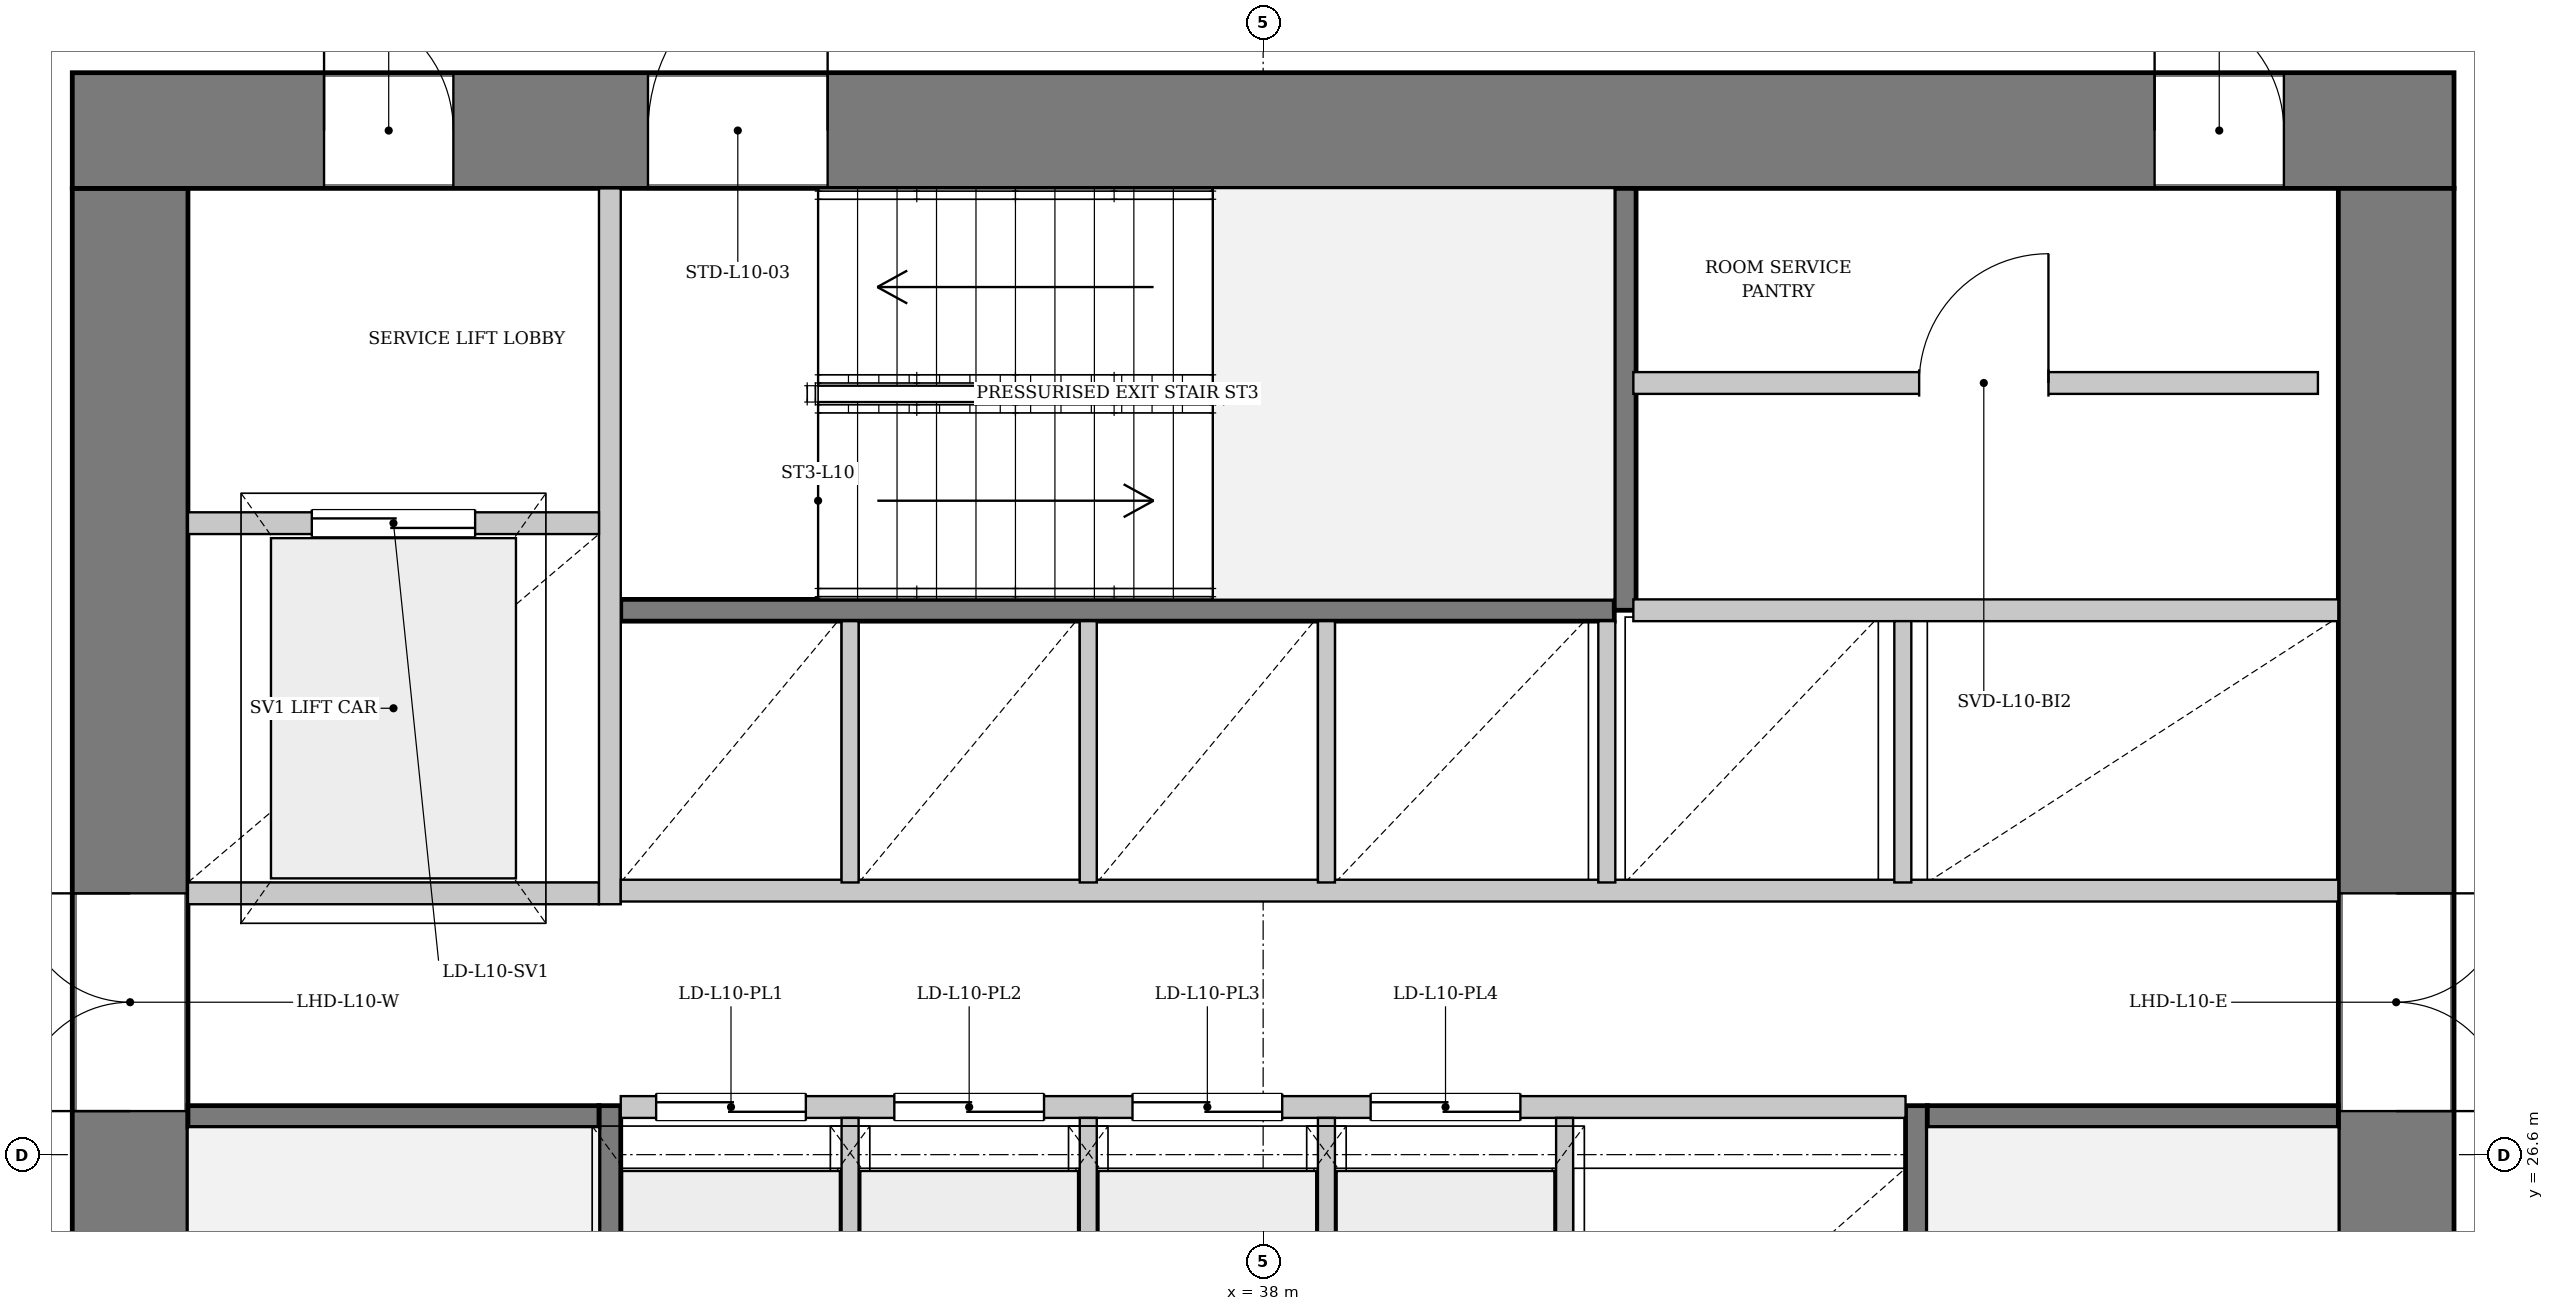
"""IFC4 building model, lengths in metres.
Left out: names, types, materials, properties, quantities, classifications, styles, units other than length and angle.
Written with IfcOpenShell. Run it as: python <this file> out.ifc"""

import sys

from ifc_helpers import new_model, si_unit, direction, frame, frame_2d, origin, place, context, subcontext, project, spatial, rectangle, extrude, source, transform, mapped, element, fill, save


model = new_model("IFC4")
c1 = context("Model", 3, precision=1e-05, world=origin(), true_north=direction((0.0, 1.0)))
c2 = subcontext(c1, "Body", "Model", "MODEL_VIEW")
j1 = project(units=[si_unit("LENGTHUNIT", "METRE"), si_unit("PLANEANGLEUNIT", "RADIAN")], contexts=[c1])
p1 = place(None, origin())
s1 = spatial("IfcSite", under=j1, at=p1, CompositionType="ELEMENT")
p2 = place(p1, origin())
s2 = spatial("IfcBuilding", under=s1, at=p2, CompositionType="ELEMENT")
p3 = place(p2, frame((0.0, 0.0, 43.5)))
s3 = spatial("IfcBuildingStorey", under=s2, at=p3, CompositionType="ELEMENT", Elevation=43.5)
p4 = place(p3, frame((29.675, 19.5, 0.0), z_axis=(0.0, 0.0, 1.0), x_axis=(0.0, 1.0, 0.0)))
e1 = element("IfcWall", 1, at=p4, inside=s3, PredefinedType="SHEAR", context=c2, shape_type="SweptSolid", body=[
    extrude(rectangle(XDim=14.2, YDim=0.85, at=frame_2d((7.1, 0.0))), origin(), (0.0, 0.0, 1.0), 3.3),
])
p5 = place(p4, frame((7.42, 0.0, 0.0)))
e2 = element("IfcOpeningElement", 2, at=p5, cuts=e1, PredefinedType="OPENING", context=c2, shape_type="SweptSolid", body=[
    extrude(rectangle(XDim=1.6, YDim=2.2, at=frame_2d((0.8, 1.1))), frame((0.0, 0.435, 0.0), z_axis=(0.0, -1.0, 0.0), x_axis=(1.0, 0.0, 0.0)), (0.0, 0.0, 1.0), 0.87),
])
p6 = place(p3, frame((29.25, 34.125, 0.0), z_axis=(0.0, 0.0, 1.0), x_axis=(1.0, 0.0, 0.0)))
e3 = element("IfcWall", 3, at=p6, inside=s3, PredefinedType="SHEAR", context=c2, shape_type="SweptSolid", body=[
    extrude(rectangle(XDim=17.5, YDim=0.85, at=frame_2d((8.75, 0.0))), origin(), (0.0, 0.0, 1.0), 3.3),
])
p7 = place(p6, frame((1.85, 0.0, 0.0)))
e4 = element("IfcOpeningElement", 4, at=p7, cuts=e3, PredefinedType="OPENING", context=c2, shape_type="SweptSolid", body=[
    extrude(rectangle(XDim=0.95, YDim=2.1, at=frame_2d((0.475, 1.05))), frame((0.0, 0.435, 0.0), z_axis=(0.0, -1.0, 0.0), x_axis=(1.0, 0.0, 0.0)), (0.0, 0.0, 1.0), 0.87),
])
p8 = place(p6, frame((4.23, 0.0, 0.0)))
e5 = element("IfcOpeningElement", 5, at=p8, cuts=e3, PredefinedType="OPENING", context=c2, shape_type="SweptSolid", body=[
    extrude(rectangle(XDim=1.32, YDim=2.2, at=frame_2d((0.66, 1.1))), frame((0.0, 0.435, 0.0), z_axis=(0.0, -1.0, 0.0), x_axis=(1.0, 0.0, 0.0)), (0.0, 0.0, 1.0), 0.87),
])
p9 = place(p6, frame((15.3, 0.0, 0.0)))
e6 = element("IfcOpeningElement", 6, at=p9, cuts=e3, PredefinedType="OPENING", context=c2, shape_type="SweptSolid", body=[
    extrude(rectangle(XDim=0.95, YDim=2.1, at=frame_2d((0.475, 1.05))), frame((0.0, 0.435, 0.0), z_axis=(0.0, -1.0, 0.0), x_axis=(1.0, 0.0, 0.0)), (0.0, 0.0, 1.0), 0.87),
])
p10 = place(p3, frame((46.325, 33.7, 0.0), z_axis=(0.0, 0.0, 1.0), x_axis=(0.0, -1.0, 0.0)))
e7 = element("IfcWall", 7, at=p10, inside=s3, PredefinedType="SHEAR", context=c2, shape_type="SweptSolid", body=[
    extrude(rectangle(XDim=14.2, YDim=0.85, at=frame_2d((7.1, 0.0))), origin(), (0.0, 0.0, 1.0), 3.3),
])
p11 = place(p10, frame((5.18, 0.0, 0.0)))
e8 = element("IfcOpeningElement", 8, at=p11, cuts=e7, PredefinedType="OPENING", context=c2, shape_type="SweptSolid", body=[
    extrude(rectangle(XDim=1.6, YDim=2.2, at=frame_2d((0.8, 1.1))), frame((0.0, 0.435, 0.0), z_axis=(0.0, -1.0, 0.0), x_axis=(1.0, 0.0, 0.0)), (0.0, 0.0, 1.0), 0.87),
])
p12 = place(p3, frame((33.2, 19.5, 0.0), z_axis=(0.0, 0.0, 1.0), x_axis=(0.0, 1.0, 0.0)))
e9 = element("IfcWall", 9, at=p12, inside=s3, PredefinedType="PARTITIONING", context=c2, shape_type="SweptSolid", body=[
    extrude(rectangle(XDim=7.46, YDim=0.16, at=frame_2d((3.73, 0.0))), origin(), (0.0, 0.0, 1.0), 3.3),
])
p13 = place(p12, frame((0.08, 0.0, 0.0)))
e10 = element("IfcOpeningElement", 10, at=p13, cuts=e9, PredefinedType="OPENING", context=c2, shape_type="SweptSolid", body=[
    extrude(rectangle(XDim=1.32, YDim=2.2, at=frame_2d((0.66, 1.1))), frame((0.0, 0.09, 0.0), z_axis=(0.0, -1.0, 0.0), x_axis=(1.0, 0.0, 0.0)), (0.0, 0.0, 1.0), 0.18),
])
p14 = place(p3, frame((30.1, 26.88, 0.0), z_axis=(0.0, 0.0, 1.0), x_axis=(1.0, 0.0, 0.0)))
e11 = element("IfcWall", 11, at=p14, inside=s3, PredefinedType="PARTITIONING", context=c2, shape_type="SweptSolid", body=[
    extrude(rectangle(XDim=3.02, YDim=0.16, at=frame_2d((1.51, 0.0))), origin(), (0.0, 0.0, 1.0), 3.3),
])
p15 = place(p3, frame((42.8, 26.96, 0.0), z_axis=(0.0, 0.0, 1.0), x_axis=(0.0, -1.0, 0.0)))
e12 = element("IfcWall", 12, at=p15, inside=s3, PredefinedType="PARTITIONING", context=c2, shape_type="SweptSolid", body=[
    extrude(rectangle(XDim=7.46, YDim=0.16, at=frame_2d((3.73, 0.0))), origin(), (0.0, 0.0, 1.0), 3.3),
])
p16 = place(p15, frame((6.06, 0.0, 0.0)))
e13 = element("IfcOpeningElement", 13, at=p16, cuts=e12, PredefinedType="OPENING", context=c2, shape_type="SweptSolid", body=[
    extrude(rectangle(XDim=1.32, YDim=2.2, at=frame_2d((0.66, 1.1))), frame((0.0, 0.09, 0.0), z_axis=(0.0, -1.0, 0.0), x_axis=(1.0, 0.0, 0.0)), (0.0, 0.0, 1.0), 0.18),
])
p17 = place(p3, frame((42.88, 26.88, 0.0), z_axis=(0.0, 0.0, 1.0), x_axis=(1.0, 0.0, 0.0)))
e14 = element("IfcWall", 14, at=p17, inside=s3, PredefinedType="PARTITIONING", context=c2, shape_type="SweptSolid", body=[
    extrude(rectangle(XDim=3.02, YDim=0.16, at=frame_2d((1.51, 0.0))), origin(), (0.0, 0.0, 1.0), 3.3),
])
p18 = place(p3, frame((33.28, 30.6, 0.0), z_axis=(0.0, 0.0, 1.0), x_axis=(1.0, 0.0, 0.0)))
e15 = element("IfcWall", 15, at=p18, inside=s3, PredefinedType="PARTITIONING", context=c2, shape_type="SweptSolid", body=[
    extrude(rectangle(XDim=7.3, YDim=0.16, at=frame_2d((3.65, 0.0))), origin(), (0.0, 0.0, 1.0), 3.3),
])
p19 = place(p3, frame((40.66, 30.6, 0.0), z_axis=(0.0, 0.0, 1.0), x_axis=(0.0, 1.0, 0.0)))
e16 = element("IfcWall", 16, at=p19, inside=s3, PredefinedType="PARTITIONING", context=c2, shape_type="SweptSolid", body=[
    extrude(rectangle(XDim=3.1, YDim=0.16, at=frame_2d((1.55, 0.0))), origin(), (0.0, 0.0, 1.0), 3.3),
])
p20 = place(p3, frame((30.1, 28.52, 0.0), z_axis=(0.0, 0.0, 1.0), x_axis=(1.0, 0.0, 0.0)))
e17 = element("IfcWall", 17, at=p20, inside=s3, PredefinedType="PARTITIONING", context=c2, shape_type="SweptSolid", body=[
    extrude(rectangle(XDim=3.02, YDim=0.16, at=frame_2d((1.51, 0.0))), origin(), (0.0, 0.0, 1.0), 3.3),
])
p21 = place(p3, frame((33.2, 28.44, 0.0), z_axis=(0.0, 0.0, 1.0), x_axis=(0.0, 1.0, 0.0)))
e18 = element("IfcWall", 18, at=p21, inside=s3, PredefinedType="PARTITIONING", context=c2, shape_type="SweptSolid", body=[
    extrude(rectangle(XDim=5.26, YDim=0.16, at=frame_2d((2.63, 0.0))), origin(), (0.0, 0.0, 1.0), 3.3),
])
p22 = place(p3, frame((30.1, 31.24, 0.0), z_axis=(0.0, 0.0, 1.0), x_axis=(1.0, 0.0, 0.0)))
e19 = element("IfcWall", 19, at=p22, inside=s3, PredefinedType="PARTITIONING", context=c2, shape_type="SweptSolid", body=[
    extrude(rectangle(XDim=3.02, YDim=0.16, at=frame_2d((1.51, 0.0))), origin(), (0.0, 0.0, 1.0), 3.3),
])
p23 = place(p22, frame((0.91, 0.0, 0.0)))
e20 = element("IfcOpeningElement", 20, at=p23, cuts=e19, PredefinedType="OPENING", context=c2, shape_type="SweptSolid", body=[
    extrude(rectangle(XDim=1.2, YDim=2.2, at=frame_2d((0.6, 1.1))), frame((0.0, 0.09, 0.0), z_axis=(0.0, -1.0, 0.0), x_axis=(1.0, 0.0, 0.0)), (0.0, 0.0, 1.0), 0.18),
])
p24 = place(p3, frame((33.28, 26.95, 0.0), z_axis=(0.0, 0.0, 1.0), x_axis=(1.0, 0.0, 0.0)))
e21 = element("IfcWall", 21, at=p24, inside=s3, PredefinedType="PARTITIONING", context=c2, shape_type="SweptSolid", body=[
    extrude(rectangle(XDim=9.44, YDim=0.16, at=frame_2d((4.72, 0.0))), origin(), (0.0, 0.0, 1.0), 3.3),
])
p25 = place(p24, frame((0.26, 0.0, 0.0)))
e22 = element("IfcOpeningElement", 22, at=p25, cuts=e21, PredefinedType="OPENING", context=c2, shape_type="SweptSolid", body=[
    extrude(rectangle(XDim=1.1, YDim=2.2, at=frame_2d((0.55, 1.1))), frame((0.0, 0.09, 0.0), z_axis=(0.0, -1.0, 0.0), x_axis=(1.0, 0.0, 0.0)), (0.0, 0.0, 1.0), 0.18),
])
p26 = place(p24, frame((2.01, 0.0, 0.0)))
e23 = element("IfcOpeningElement", 23, at=p26, cuts=e21, PredefinedType="OPENING", context=c2, shape_type="SweptSolid", body=[
    extrude(rectangle(XDim=1.1, YDim=2.2, at=frame_2d((0.55, 1.1))), frame((0.0, 0.09, 0.0), z_axis=(0.0, -1.0, 0.0), x_axis=(1.0, 0.0, 0.0)), (0.0, 0.0, 1.0), 0.18),
])
p27 = place(p24, frame((3.76, 0.0, 0.0)))
e24 = element("IfcOpeningElement", 24, at=p27, cuts=e21, PredefinedType="OPENING", context=c2, shape_type="SweptSolid", body=[
    extrude(rectangle(XDim=1.1, YDim=2.2, at=frame_2d((0.55, 1.1))), frame((0.0, 0.09, 0.0), z_axis=(0.0, -1.0, 0.0), x_axis=(1.0, 0.0, 0.0)), (0.0, 0.0, 1.0), 0.18),
])
p28 = place(p24, frame((5.51, 0.0, 0.0)))
e25 = element("IfcOpeningElement", 25, at=p28, cuts=e21, PredefinedType="OPENING", context=c2, shape_type="SweptSolid", body=[
    extrude(rectangle(XDim=1.1, YDim=2.2, at=frame_2d((0.55, 1.1))), frame((0.0, 0.09, 0.0), z_axis=(0.0, -1.0, 0.0), x_axis=(1.0, 0.0, 0.0)), (0.0, 0.0, 1.0), 0.18),
])
for number, where, z_axis, x_axis in (
    (26, (34.965, 24.56, 0.0), (0.0, 0.0, 1.0), (0.0, 1.0, 0.0)),
    (27, (36.715, 24.56, 0.0), (0.0, 0.0, 1.0), (0.0, 1.0, 0.0)),
    (28, (38.465, 24.56, 0.0), (0.0, 0.0, 1.0), (0.0, 1.0, 0.0)),
    (29, (40.215, 24.56, 0.0), (0.0, 0.0, 1.0), (0.0, 1.0, 0.0)),
):
    element("IfcWall", number, at=place(p3, frame(where, z_axis=z_axis, x_axis=x_axis)), inside=s3, PredefinedType="PARTITIONING", context=c2, shape_type="SweptSolid", body=[
        extrude(rectangle(XDim=2.31, YDim=0.125, at=frame_2d((1.155, 0.0))), origin(), (0.0, 0.0, 1.0), 3.3),
    ])
p29 = place(p3, frame((33.28, 28.54, 0.0), z_axis=(0.0, 0.0, 1.0), x_axis=(1.0, 0.0, 0.0)))
e30 = element("IfcWall", 30, at=p29, inside=s3, PredefinedType="PARTITIONING", context=c2, shape_type="SweptSolid", body=[
    extrude(rectangle(XDim=12.62, YDim=0.16, at=frame_2d((6.31, 0.0))), origin(), (0.0, 0.0, 1.0), 3.3),
])
p30 = place(p3, frame((40.72, 30.6, 0.0), z_axis=(0.0, 0.0, 1.0), x_axis=(1.0, 0.0, 0.0)))
e31 = element("IfcWall", 31, at=p30, inside=s3, PredefinedType="PARTITIONING", context=c2, shape_type="SweptSolid", body=[
    extrude(rectangle(XDim=5.18, YDim=0.16, at=frame_2d((2.59, 0.0))), origin(), (0.0, 0.0, 1.0), 3.3),
])
for number, where, z_axis, x_axis in (
    (32, (34.965, 28.6, 0.0), (0.0, 0.0, 1.0), (0.0, 1.0, 0.0)),
    (33, (36.715, 28.6, 0.0), (0.0, 0.0, 1.0), (0.0, 1.0, 0.0)),
    (34, (38.465, 28.6, 0.0), (0.0, 0.0, 1.0), (0.0, 1.0, 0.0)),
    (35, (40.525, 28.6, 0.0), (0.0, 0.0, 1.0), (0.0, 1.0, 0.0)),
    (36, (42.7, 28.6, 0.0), (0.0, 0.0, 1.0), (0.0, 1.0, 0.0)),
):
    element("IfcWall", number, at=place(p3, frame(where, z_axis=z_axis, x_axis=x_axis)), inside=s3, PredefinedType="PARTITIONING", context=c2, shape_type="SweptSolid", body=[
        extrude(rectangle(XDim=1.92, YDim=0.125, at=frame_2d((0.96, 0.0))), origin(), (0.0, 0.0, 1.0), 3.3),
    ])
p31 = place(p3, frame((40.72, 32.27, 0.0), z_axis=(0.0, 0.0, 1.0), x_axis=(1.0, 0.0, 0.0)))
e37 = element("IfcWall", 37, at=p31, inside=s3, PredefinedType="PARTITIONING", context=c2, shape_type="SweptSolid", body=[
    extrude(rectangle(XDim=5.03, YDim=0.16, at=frame_2d((2.515, 0.0))), origin(), (0.0, 0.0, 1.0), 3.3),
])
p32 = place(p31, frame((2.1, 0.0, 0.0)))
e38 = element("IfcOpeningElement", 38, at=p32, cuts=e37, PredefinedType="OPENING", context=c2, shape_type="SweptSolid", body=[
    extrude(rectangle(XDim=0.95, YDim=2.1, at=frame_2d((0.475, 1.05))), frame((0.0, 0.09, 0.0), z_axis=(0.0, -1.0, 0.0), x_axis=(1.0, 0.0, 0.0)), (0.0, 0.0, 1.0), 0.18),
])
m1 = source(origin(), c2, "Body", "SweptSolid", [
    extrude(rectangle(XDim=1.6, YDim=2.2, at=frame_2d((0.8, 1.1))), frame((0.0, 0.025, 0.0), z_axis=(0.0, -1.0, 0.0), x_axis=(1.0, 0.0, 0.0)), (0.0, 0.0, 1.0), 0.05),
])
p33 = place(p5, origin())
e39 = element("IfcDoor", 39, at=p33, inside=s3, OperationType="DOUBLE_DOOR_SINGLE_SWING", PredefinedType="DOOR", context=c2, shape_type="MappedRepresentation", body=[
    mapped(m1, transform((0.0, 0.0, 0.0), x_axis=(1.0, 0.0, 0.0), y_axis=(0.0, 1.0, 0.0), z_axis=(0.0, 0.0, 1.0), scale=1.0)),
])
fill(e2, e39)
m2 = source(origin(), c2, "Body", "SweptSolid", [
    extrude(rectangle(XDim=0.95, YDim=2.1, at=frame_2d((0.475, 1.05))), frame((0.0, 0.025, 0.0), z_axis=(0.0, -1.0, 0.0), x_axis=(1.0, 0.0, 0.0)), (0.0, 0.0, 1.0), 0.05),
])
p34 = place(p7, origin())
e40 = element("IfcDoor", 40, at=p34, inside=s3, OperationType="SINGLE_SWING_LEFT", PredefinedType="DOOR", context=c2, shape_type="MappedRepresentation", body=[
    mapped(m2, transform((0.0, 0.0, 0.0), x_axis=(1.0, 0.0, 0.0), y_axis=(0.0, 1.0, 0.0), z_axis=(0.0, 0.0, 1.0), scale=1.0)),
])
fill(e4, e40)
m3 = source(origin(), c2, "Body", "SweptSolid", [
    extrude(rectangle(XDim=1.32, YDim=2.2, at=frame_2d((0.66, 1.1))), frame((0.0, 0.025, 0.0), z_axis=(0.0, -1.0, 0.0), x_axis=(1.0, 0.0, 0.0)), (0.0, 0.0, 1.0), 0.05),
])
p35 = place(p8, origin())
e41 = element("IfcDoor", 41, at=p35, inside=s3, OperationType="SINGLE_SWING_RIGHT", PredefinedType="DOOR", context=c2, shape_type="MappedRepresentation", body=[
    mapped(m3, transform((0.0, 0.0, 0.0), x_axis=(1.0, 0.0, 0.0), y_axis=(0.0, 1.0, 0.0), z_axis=(0.0, 0.0, 1.0), scale=1.0)),
])
fill(e5, e41)
p36 = place(p11, origin())
e42 = element("IfcDoor", 42, at=p36, inside=s3, OperationType="DOUBLE_DOOR_SINGLE_SWING", PredefinedType="DOOR", context=c2, shape_type="MappedRepresentation", body=[
    mapped(m1, transform((0.0, 0.0, 0.0), x_axis=(1.0, 0.0, 0.0), y_axis=(0.0, 1.0, 0.0), z_axis=(0.0, 0.0, 1.0), scale=1.0)),
])
fill(e8, e42)
m4 = source(origin(), c2, "Body", "SweptSolid", [
    extrude(rectangle(XDim=1.2, YDim=2.2, at=frame_2d((0.6, 1.1))), frame((0.0, 0.025, 0.0), z_axis=(0.0, -1.0, 0.0), x_axis=(1.0, 0.0, 0.0)), (0.0, 0.0, 1.0), 0.05),
])
p37 = place(p23, origin())
e43 = element("IfcDoor", 43, at=p37, inside=s3, OperationType="DOUBLE_DOOR_SLIDING", PredefinedType="DOOR", context=c2, shape_type="MappedRepresentation", body=[
    mapped(m4, transform((0.0, 0.0, 0.0), x_axis=(1.0, 0.0, 0.0), y_axis=(0.0, 1.0, 0.0), z_axis=(0.0, 0.0, 1.0), scale=1.0)),
])
fill(e20, e43)
m5 = source(origin(), c2, "Body", "SweptSolid", [
    extrude(rectangle(XDim=1.1, YDim=2.2, at=frame_2d((0.55, 1.1))), frame((0.0, 0.025, 0.0), z_axis=(0.0, -1.0, 0.0), x_axis=(1.0, 0.0, 0.0)), (0.0, 0.0, 1.0), 0.05),
])
p38 = place(p25, origin())
e44 = element("IfcDoor", 44, at=p38, inside=s3, OperationType="DOUBLE_DOOR_SLIDING", PredefinedType="DOOR", context=c2, shape_type="MappedRepresentation", body=[
    mapped(m5, transform((0.0, 0.0, 0.0), x_axis=(1.0, 0.0, 0.0), y_axis=(0.0, 1.0, 0.0), z_axis=(0.0, 0.0, 1.0), scale=1.0)),
])
fill(e22, e44)
p39 = place(p26, origin())
e45 = element("IfcDoor", 45, at=p39, inside=s3, OperationType="DOUBLE_DOOR_SLIDING", PredefinedType="DOOR", context=c2, shape_type="MappedRepresentation", body=[
    mapped(m5, transform((0.0, 0.0, 0.0), x_axis=(1.0, 0.0, 0.0), y_axis=(0.0, 1.0, 0.0), z_axis=(0.0, 0.0, 1.0), scale=1.0)),
])
fill(e23, e45)
p40 = place(p27, origin())
e46 = element("IfcDoor", 46, at=p40, inside=s3, OperationType="DOUBLE_DOOR_SLIDING", PredefinedType="DOOR", context=c2, shape_type="MappedRepresentation", body=[
    mapped(m5, transform((0.0, 0.0, 0.0), x_axis=(1.0, 0.0, 0.0), y_axis=(0.0, 1.0, 0.0), z_axis=(0.0, 0.0, 1.0), scale=1.0)),
])
fill(e24, e46)
p41 = place(p28, origin())
e47 = element("IfcDoor", 47, at=p41, inside=s3, OperationType="DOUBLE_DOOR_SLIDING", PredefinedType="DOOR", context=c2, shape_type="MappedRepresentation", body=[
    mapped(m5, transform((0.0, 0.0, 0.0), x_axis=(1.0, 0.0, 0.0), y_axis=(0.0, 1.0, 0.0), z_axis=(0.0, 0.0, 1.0), scale=1.0)),
])
fill(e25, e47)
p42 = place(p32, origin())
e48 = element("IfcDoor", 48, at=p42, inside=s3, OperationType="SINGLE_SWING_RIGHT", PredefinedType="DOOR", context=c2, shape_type="MappedRepresentation", body=[
    mapped(m2, transform((0.0, 0.0, 0.0), x_axis=(1.0, 0.0, 0.0), y_axis=(0.0, 1.0, 0.0), z_axis=(0.0, 0.0, 1.0), scale=1.0)),
])
fill(e38, e48)
p43 = place(p9, origin())
e49 = element("IfcDoor", 49, at=p43, inside=s3, OperationType="SINGLE_SWING_LEFT", PredefinedType="DOOR", context=c2, shape_type="MappedRepresentation", body=[
    mapped(m2, transform((0.0, 0.0, 0.0), x_axis=(1.0, 0.0, 0.0), y_axis=(0.0, 1.0, 0.0), z_axis=(0.0, 0.0, 1.0), scale=1.0)),
])
fill(e6, e49)
save(model, sys.argv[1])
